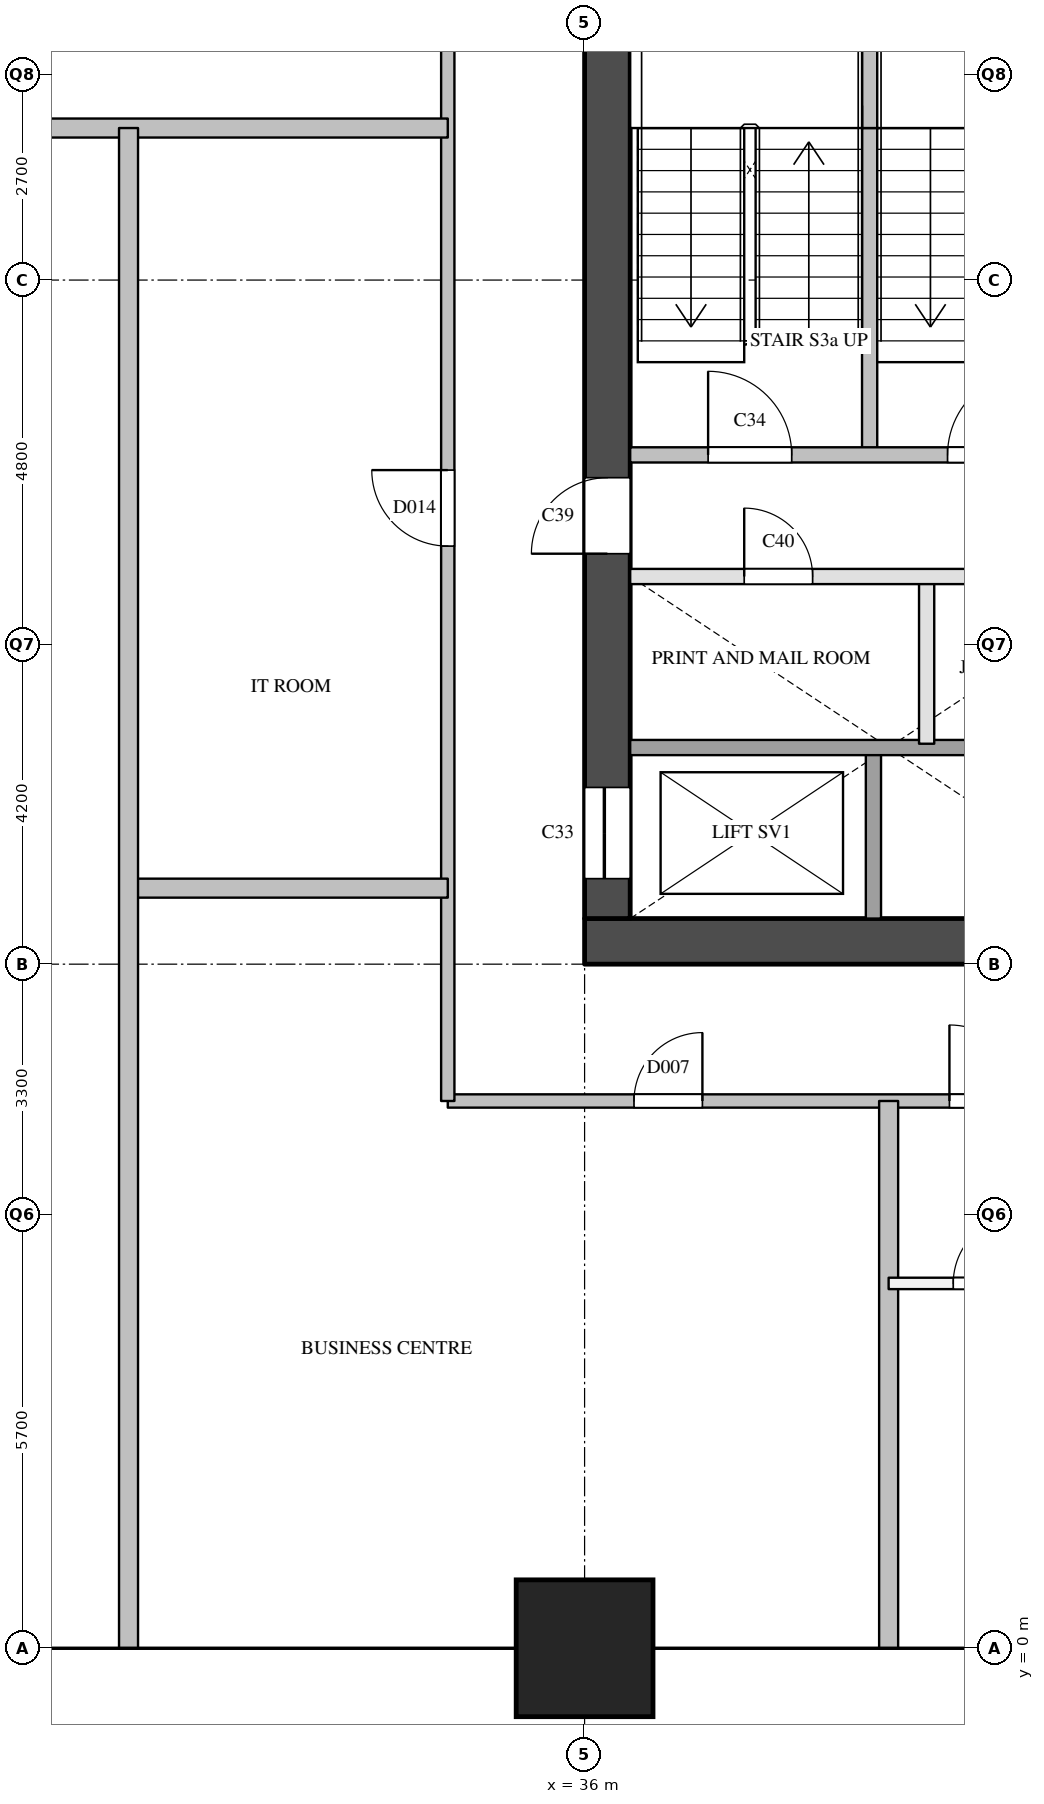
"""IFC4 building model, lengths in metres.
Left out: names, types, materials, properties, quantities, classifications, styles, units other than length and angle.
Written with IfcOpenShell. Run it as: python <this file> out.ifc"""

import sys

from ifc_helpers import new_model, si_unit, direction, frame, frame_2d, origin, origin_2d, place, context, subcontext, project, spatial, rectangle, extrude, element, fill, save


model = new_model("IFC4")
c1 = context("Model", 3, precision=1e-05, world=origin(), true_north=direction((0.0, 1.0)))
c2 = subcontext(c1, "Body", "Model", "MODEL_VIEW")
j1 = project(units=[si_unit("LENGTHUNIT", "METRE"), si_unit("PLANEANGLEUNIT", "RADIAN")], contexts=[c1])
p1 = place(None, origin())
s1 = spatial("IfcSite", under=j1, at=p1, CompositionType="ELEMENT")
p2 = place(p1, origin())
s2 = spatial("IfcBuilding", under=s1, at=p2, CompositionType="ELEMENT")
p3 = place(p2, frame((0.0, 0.0, 42.4)))
s3 = spatial("IfcBuildingStorey", under=s2, at=p3, CompositionType="ELEMENT", Elevation=42.4)
p4 = place(p3, frame((36.0, 0.0, 0.0), z_axis=(0.0, 0.0, 1.0), x_axis=(1.0, 0.0, 0.0)))
e1 = element("IfcColumn", 1, at=p4, inside=s3, PredefinedType="COLUMN", context=c2, shape_type="SweptSolid", body=[
    extrude(rectangle(XDim=1.8, YDim=1.8, at=origin_2d()), origin(), (0.0, 0.0, 1.0), 3.8),
])
p5 = place(p3, frame((36.0, 9.3, 0.0), z_axis=(0.0, 0.0, 1.0), x_axis=(1.0, 0.0, 0.0)))
e2 = element("IfcWall", 2, at=p5, inside=s3, PredefinedType="SHEAR", context=c2, shape_type="SweptSolid", body=[
    extrude(rectangle(XDim=9.0, YDim=0.6, at=frame_2d((4.5, 0.0))), origin(), (0.0, 0.0, 1.0), 3.5),
])
p6 = place(p3, frame((36.3, 9.6, 0.0), z_axis=(0.0, 0.0, 1.0), x_axis=(0.0, 1.0, 0.0)))
e3 = element("IfcWall", 3, at=p6, inside=s3, PredefinedType="SHEAR", context=c2, shape_type="SweptSolid", body=[
    extrude(rectangle(XDim=12.3, YDim=0.6, at=frame_2d((6.15, 0.0))), origin(), (0.0, 0.0, 1.0), 3.5),
])
p7 = place(p6, frame((0.525, 0.0, 0.0)))
e4 = element("IfcOpeningElement", 4, at=p7, cuts=e3, PredefinedType="OPENING", context=c2, shape_type="SweptSolid", body=[
    extrude(rectangle(XDim=1.2, YDim=2.1, at=frame_2d((0.6, 1.05))), frame((0.0, 0.31, 0.0), z_axis=(0.0, -1.0, 0.0), x_axis=(1.0, 0.0, 0.0)), (0.0, 0.0, 1.0), 0.62),
])
p8 = place(p6, frame((4.8, 0.0, 0.0)))
e5 = element("IfcOpeningElement", 5, at=p8, cuts=e3, PredefinedType="OPENING", context=c2, shape_type="SweptSolid", body=[
    extrude(rectangle(XDim=1.0, YDim=2.1, at=frame_2d((0.5, 1.05))), frame((0.0, 0.31, 0.0), z_axis=(0.0, -1.0, 0.0), x_axis=(1.0, 0.0, 0.0)), (0.0, 0.0, 1.0), 0.62),
])
p9 = place(p3, frame((39.75, 15.7, 0.0), z_axis=(0.0, 0.0, 1.0), x_axis=(0.0, 1.0, 0.0)))
e6 = element("IfcWall", 6, at=p9, inside=s3, PredefinedType="SOLIDWALL", context=c2, shape_type="SweptSolid", body=[
    extrude(rectangle(XDim=4.3, YDim=0.2, at=frame_2d((2.15, 0.0))), origin(), (0.0, 0.0, 1.0), 3.5),
])
p10 = place(p3, frame((39.75, 20.0, 0.0), z_axis=(0.0, 0.0, 1.0), x_axis=(0.0, 1.0, 0.0)))
e7 = element("IfcWall", 7, at=p10, inside=s3, PredefinedType="SOLIDWALL", context=c2, shape_type="SweptSolid", body=[
    extrude(rectangle(XDim=1.9, YDim=0.2, at=frame_2d((0.95, 0.0))), origin(), (0.0, 0.0, 1.0), 3.5),
])
p11 = place(p3, frame((39.8, 9.6, 0.0), z_axis=(0.0, 0.0, 1.0), x_axis=(0.0, 1.0, 0.0)))
e8 = element("IfcWall", 8, at=p11, inside=s3, PredefinedType="SOLIDWALL", context=c2, shape_type="SweptSolid", body=[
    extrude(rectangle(XDim=2.3, YDim=0.2, at=frame_2d((1.15, 0.0))), origin(), (0.0, 0.0, 1.0), 3.5),
])
p12 = place(p3, frame((40.5, 11.9, 0.0), z_axis=(0.0, 0.0, 1.0), x_axis=(0.0, 1.0, 0.0)))
e9 = element("IfcWall", 9, at=p12, inside=s3, PredefinedType="PARTITIONING", context=c2, shape_type="SweptSolid", body=[
    extrude(rectangle(XDim=2.2, YDim=0.2, at=frame_2d((1.1, 0.0))), origin(), (0.0, 0.0, 1.0), 3.5),
])
p13 = place(p3, frame((36.6, 11.85, 0.0), z_axis=(0.0, 0.0, 1.0), x_axis=(1.0, 0.0, 0.0)))
e10 = element("IfcWall", 10, at=p13, inside=s3, PredefinedType="SOLIDWALL", context=c2, shape_type="SweptSolid", body=[
    extrude(rectangle(XDim=7.8, YDim=0.2, at=frame_2d((3.9, 0.0))), origin(), (0.0, 0.0, 1.0), 3.5),
])
p14 = place(p3, frame((36.6, 14.1, 0.0), z_axis=(0.0, 0.0, 1.0), x_axis=(1.0, 0.0, 0.0)))
e11 = element("IfcWall", 11, at=p14, inside=s3, PredefinedType="PARTITIONING", context=c2, shape_type="SweptSolid", body=[
    extrude(rectangle(XDim=6.0, YDim=0.2, at=frame_2d((3.0, 0.0))), origin(), (0.0, 0.0, 1.0), 3.5),
])
p15 = place(p14, frame((1.5, 0.0, 0.0)))
e12 = element("IfcOpeningElement", 12, at=p15, cuts=e11, PredefinedType="OPENING", context=c2, shape_type="SweptSolid", body=[
    extrude(rectangle(XDim=0.9, YDim=2.1, at=frame_2d((0.45, 1.05))), frame((0.0, 0.11, 0.0), z_axis=(0.0, -1.0, 0.0), x_axis=(1.0, 0.0, 0.0)), (0.0, 0.0, 1.0), 0.22),
])
p16 = place(p14, frame((4.5, 0.0, 0.0)))
e13 = element("IfcOpeningElement", 13, at=p16, cuts=e11, PredefinedType="OPENING", context=c2, shape_type="SweptSolid", body=[
    extrude(rectangle(XDim=0.9, YDim=2.1, at=frame_2d((0.45, 1.05))), frame((0.0, 0.11, 0.0), z_axis=(0.0, -1.0, 0.0), x_axis=(1.0, 0.0, 0.0)), (0.0, 0.0, 1.0), 0.22),
])
p17 = place(p3, frame((36.6, 15.7, 0.0), z_axis=(0.0, 0.0, 1.0), x_axis=(1.0, 0.0, 0.0)))
e14 = element("IfcWall", 14, at=p17, inside=s3, PredefinedType="SOLIDWALL", context=c2, shape_type="SweptSolid", body=[
    extrude(rectangle(XDim=6.3, YDim=0.2, at=frame_2d((3.15, 0.0))), origin(), (0.0, 0.0, 1.0), 3.5),
])
p18 = place(p17, frame((1.025, 0.0, 0.0)))
e15 = element("IfcOpeningElement", 15, at=p18, cuts=e14, PredefinedType="OPENING", context=c2, shape_type="SweptSolid", body=[
    extrude(rectangle(XDim=1.1, YDim=2.1, at=frame_2d((0.55, 1.05))), frame((0.0, 0.11, 0.0), z_axis=(0.0, -1.0, 0.0), x_axis=(1.0, 0.0, 0.0)), (0.0, 0.0, 1.0), 0.22),
])
p19 = place(p17, frame((4.175, 0.0, 0.0)))
e16 = element("IfcOpeningElement", 16, at=p19, cuts=e14, PredefinedType="OPENING", context=c2, shape_type="SweptSolid", body=[
    extrude(rectangle(XDim=1.1, YDim=2.1, at=frame_2d((0.55, 1.05))), frame((0.0, 0.11, 0.0), z_axis=(0.0, -1.0, 0.0), x_axis=(1.0, 0.0, 0.0)), (0.0, 0.0, 1.0), 0.22),
])
p20 = place(p3, frame((34.2, 7.2, 0.0), z_axis=(0.0, 0.0, 1.0), x_axis=(1.0, 0.0, 0.0)))
e17 = element("IfcWall", 17, at=p20, inside=s3, PredefinedType="PARTITIONING", context=c2, shape_type="SweptSolid", body=[
    extrude(rectangle(XDim=12.6, YDim=0.175, at=frame_2d((6.3, 0.0))), origin(), (0.0, 0.0, 1.0), 3.5),
])
p21 = place(p20, frame((6.6, 0.0, 0.0)))
e18 = element("IfcOpeningElement", 18, at=p21, cuts=e17, PredefinedType="OPENING", context=c2, shape_type="SweptSolid", body=[
    extrude(rectangle(XDim=1.0, YDim=2.1, at=frame_2d((0.5, 1.05))), frame((0.0, 0.097, 0.0), z_axis=(0.0, -1.0, 0.0), x_axis=(1.0, 0.0, 0.0)), (0.0, 0.0, 1.0), 0.195),
])
p22 = place(p20, frame((2.45, 0.0, 0.0)))
e19 = element("IfcOpeningElement", 19, at=p22, cuts=e17, PredefinedType="OPENING", context=c2, shape_type="SweptSolid", body=[
    extrude(rectangle(XDim=0.9, YDim=2.1, at=frame_2d((0.45, 1.05))), frame((0.0, 0.097, 0.0), z_axis=(0.0, -1.0, 0.0), x_axis=(1.0, 0.0, 0.0)), (0.0, 0.0, 1.0), 0.195),
])
p23 = place(p3, frame((34.2, 7.2, 0.0), z_axis=(0.0, 0.0, 1.0), x_axis=(0.0, 1.0, 0.0)))
e20 = element("IfcWall", 20, at=p23, inside=s3, PredefinedType="PARTITIONING", context=c2, shape_type="SweptSolid", body=[
    extrude(rectangle(XDim=16.49, YDim=0.175, at=frame_2d((8.245, 0.0))), origin(), (0.0, 0.0, 1.0), 3.5),
])
p24 = place(p23, frame((7.3, 0.0, 0.0)))
e21 = element("IfcOpeningElement", 21, at=p24, cuts=e20, PredefinedType="OPENING", context=c2, shape_type="SweptSolid", body=[
    extrude(rectangle(XDim=1.0, YDim=2.1, at=frame_2d((0.5, 1.05))), frame((0.0, 0.097, 0.0), z_axis=(0.0, -1.0, 0.0), x_axis=(1.0, 0.0, 0.0)), (0.0, 0.0, 1.0), 0.195),
])
p25 = place(p23, frame((14.145, 0.0, 0.0)))
e22 = element("IfcOpeningElement", 22, at=p25, cuts=e20, PredefinedType="OPENING", context=c2, shape_type="SweptSolid", body=[
    extrude(rectangle(XDim=1.0, YDim=2.1, at=frame_2d((0.5, 1.05))), frame((0.0, 0.097, 0.0), z_axis=(0.0, -1.0, 0.0), x_axis=(1.0, 0.0, 0.0)), (0.0, 0.0, 1.0), 0.195),
])
p26 = place(p3, frame((40.0, 4.8, 0.0), z_axis=(0.0, 0.0, 1.0), x_axis=(1.0, 0.0, 0.0)))
e23 = element("IfcWall", 23, at=p26, inside=s3, PredefinedType="PARTITIONING", context=c2, shape_type="SweptSolid", body=[
    extrude(rectangle(XDim=2.6, YDim=0.15, at=frame_2d((1.3, 0.0))), origin(), (0.0, 0.0, 1.0), 3.5),
])
p27 = place(p26, frame((0.85, 0.0, 0.0)))
e24 = element("IfcOpeningElement", 24, at=p27, cuts=e23, PredefinedType="OPENING", context=c2, shape_type="SweptSolid", body=[
    extrude(rectangle(XDim=0.9, YDim=2.1, at=frame_2d((0.45, 1.05))), frame((0.0, 0.085, 0.0), z_axis=(0.0, -1.0, 0.0), x_axis=(1.0, 0.0, 0.0)), (0.0, 0.0, 1.0), 0.17),
])
p28 = place(p3, frame((30.0, 10.0, 0.0), z_axis=(0.0, 0.0, 1.0), x_axis=(1.0, 0.0, 0.0)))
e25 = element("IfcWall", 25, at=p28, inside=s3, PredefinedType="PARTITIONING", context=c2, shape_type="SweptSolid", body=[
    extrude(rectangle(XDim=4.2, YDim=0.25, at=frame_2d((2.1, 0.0))), origin(), (0.0, 0.0, 1.0), 3.5),
])
p29 = place(p3, frame((19.875, 20.0, 0.0), z_axis=(0.0, 0.0, 1.0), x_axis=(1.0, 0.0, 0.0)))
e26 = element("IfcWall", 26, at=p29, inside=s3, PredefinedType="PARTITIONING", context=c2, shape_type="SweptSolid", body=[
    extrude(rectangle(XDim=14.325, YDim=0.25, at=frame_2d((7.163, 0.0))), origin(), (0.0, 0.0, 1.0), 2.5),
])
p30 = place(p3, frame((30.0, 0.0, 0.0), z_axis=(0.0, 0.0, 1.0), x_axis=(0.0, 1.0, 0.0)))
e27 = element("IfcWall", 27, at=p30, inside=s3, PredefinedType="PARTITIONING", context=c2, shape_type="SweptSolid", body=[
    extrude(rectangle(XDim=20.0, YDim=0.25, at=frame_2d((10.0, 0.0))), origin(), (0.0, 0.0, 1.0), 2.5),
])
p31 = place(p3, frame((40.0, 0.0, 0.0), z_axis=(0.0, 0.0, 1.0), x_axis=(0.0, 1.0, 0.0)))
e28 = element("IfcWall", 28, at=p31, inside=s3, PredefinedType="PARTITIONING", context=c2, shape_type="SweptSolid", body=[
    extrude(rectangle(XDim=7.2, YDim=0.25, at=frame_2d((3.6, 0.0))), origin(), (0.0, 0.0, 1.0), 2.5),
])
p32 = place(p7, origin())
e29 = element("IfcDoor", 29, at=p32, inside=s3, OperationType="SLIDING_TO_LEFT", PredefinedType="DOOR", context=c2, shape_type="SweptSolid", body=[
    extrude(rectangle(XDim=1.2, YDim=2.1, at=frame_2d((0.6, 1.05))), frame((0.0, 0.025, 0.0), z_axis=(0.0, -1.0, 0.0), x_axis=(1.0, 0.0, 0.0)), (0.0, 0.0, 1.0), 0.05),
])
fill(e4, e29)
p33 = place(p18, origin())
e30 = element("IfcDoor", 30, at=p33, inside=s3, OperationType="SINGLE_SWING_LEFT", PredefinedType="DOOR", context=c2, shape_type="SweptSolid", body=[
    extrude(rectangle(XDim=1.1, YDim=2.1, at=frame_2d((0.55, 1.05))), frame((0.0, 0.025, 0.0), z_axis=(0.0, -1.0, 0.0), x_axis=(1.0, 0.0, 0.0)), (0.0, 0.0, 1.0), 0.05),
])
fill(e15, e30)
p34 = place(p19, origin())
e31 = element("IfcDoor", 31, at=p34, inside=s3, OperationType="SINGLE_SWING_RIGHT", PredefinedType="DOOR", context=c2, shape_type="SweptSolid", body=[
    extrude(rectangle(XDim=1.1, YDim=2.1, at=frame_2d((0.55, 1.05))), frame((0.0, 0.025, 0.0), z_axis=(0.0, -1.0, 0.0), x_axis=(1.0, 0.0, 0.0)), (0.0, 0.0, 1.0), 0.05),
])
fill(e16, e31)
p35 = place(p8, origin())
e32 = element("IfcDoor", 32, at=p35, inside=s3, OperationType="SINGLE_SWING_LEFT", PredefinedType="DOOR", context=c2, shape_type="SweptSolid", body=[
    extrude(rectangle(XDim=1.0, YDim=2.1, at=frame_2d((0.5, 1.05))), frame((0.0, 0.025, 0.0), z_axis=(0.0, -1.0, 0.0), x_axis=(1.0, 0.0, 0.0)), (0.0, 0.0, 1.0), 0.05),
])
fill(e5, e32)
p36 = place(p15, origin())
e33 = element("IfcDoor", 33, at=p36, inside=s3, OperationType="SINGLE_SWING_LEFT", PredefinedType="DOOR", context=c2, shape_type="SweptSolid", body=[
    extrude(rectangle(XDim=0.9, YDim=2.1, at=frame_2d((0.45, 1.05))), frame((0.0, 0.025, 0.0), z_axis=(0.0, -1.0, 0.0), x_axis=(1.0, 0.0, 0.0)), (0.0, 0.0, 1.0), 0.05),
])
fill(e12, e33)
p37 = place(p21, origin())
e34 = element("IfcDoor", 34, at=p37, inside=s3, OperationType="SINGLE_SWING_LEFT", PredefinedType="DOOR", context=c2, shape_type="SweptSolid", body=[
    extrude(rectangle(XDim=1.0, YDim=2.1, at=frame_2d((0.5, 1.05))), frame((0.0, 0.025, 0.0), z_axis=(0.0, -1.0, 0.0), x_axis=(1.0, 0.0, 0.0)), (0.0, 0.0, 1.0), 0.05),
])
fill(e18, e34)
p38 = place(p27, origin())
e35 = element("IfcDoor", 35, at=p38, inside=s3, OperationType="SINGLE_SWING_RIGHT", PredefinedType="DOOR", context=c2, shape_type="SweptSolid", body=[
    extrude(rectangle(XDim=0.9, YDim=2.1, at=frame_2d((0.45, 1.05))), frame((0.0, 0.025, 0.0), z_axis=(0.0, -1.0, 0.0), x_axis=(1.0, 0.0, 0.0)), (0.0, 0.0, 1.0), 0.05),
])
fill(e24, e35)
p39 = place(p22, origin())
e36 = element("IfcDoor", 36, at=p39, inside=s3, OperationType="SINGLE_SWING_RIGHT", PredefinedType="DOOR", context=c2, shape_type="SweptSolid", body=[
    extrude(rectangle(XDim=0.9, YDim=2.1, at=frame_2d((0.45, 1.05))), frame((0.0, 0.025, 0.0), z_axis=(0.0, -1.0, 0.0), x_axis=(1.0, 0.0, 0.0)), (0.0, 0.0, 1.0), 0.05),
])
fill(e19, e36)
p40 = place(p24, origin())
e37 = element("IfcDoor", 37, at=p40, inside=s3, OperationType="SINGLE_SWING_RIGHT", PredefinedType="DOOR", context=c2, shape_type="SweptSolid", body=[
    extrude(rectangle(XDim=1.0, YDim=2.1, at=frame_2d((0.5, 1.05))), frame((0.0, 0.025, 0.0), z_axis=(0.0, -1.0, 0.0), x_axis=(1.0, 0.0, 0.0)), (0.0, 0.0, 1.0), 0.05),
])
fill(e21, e37)
save(model, sys.argv[1])
